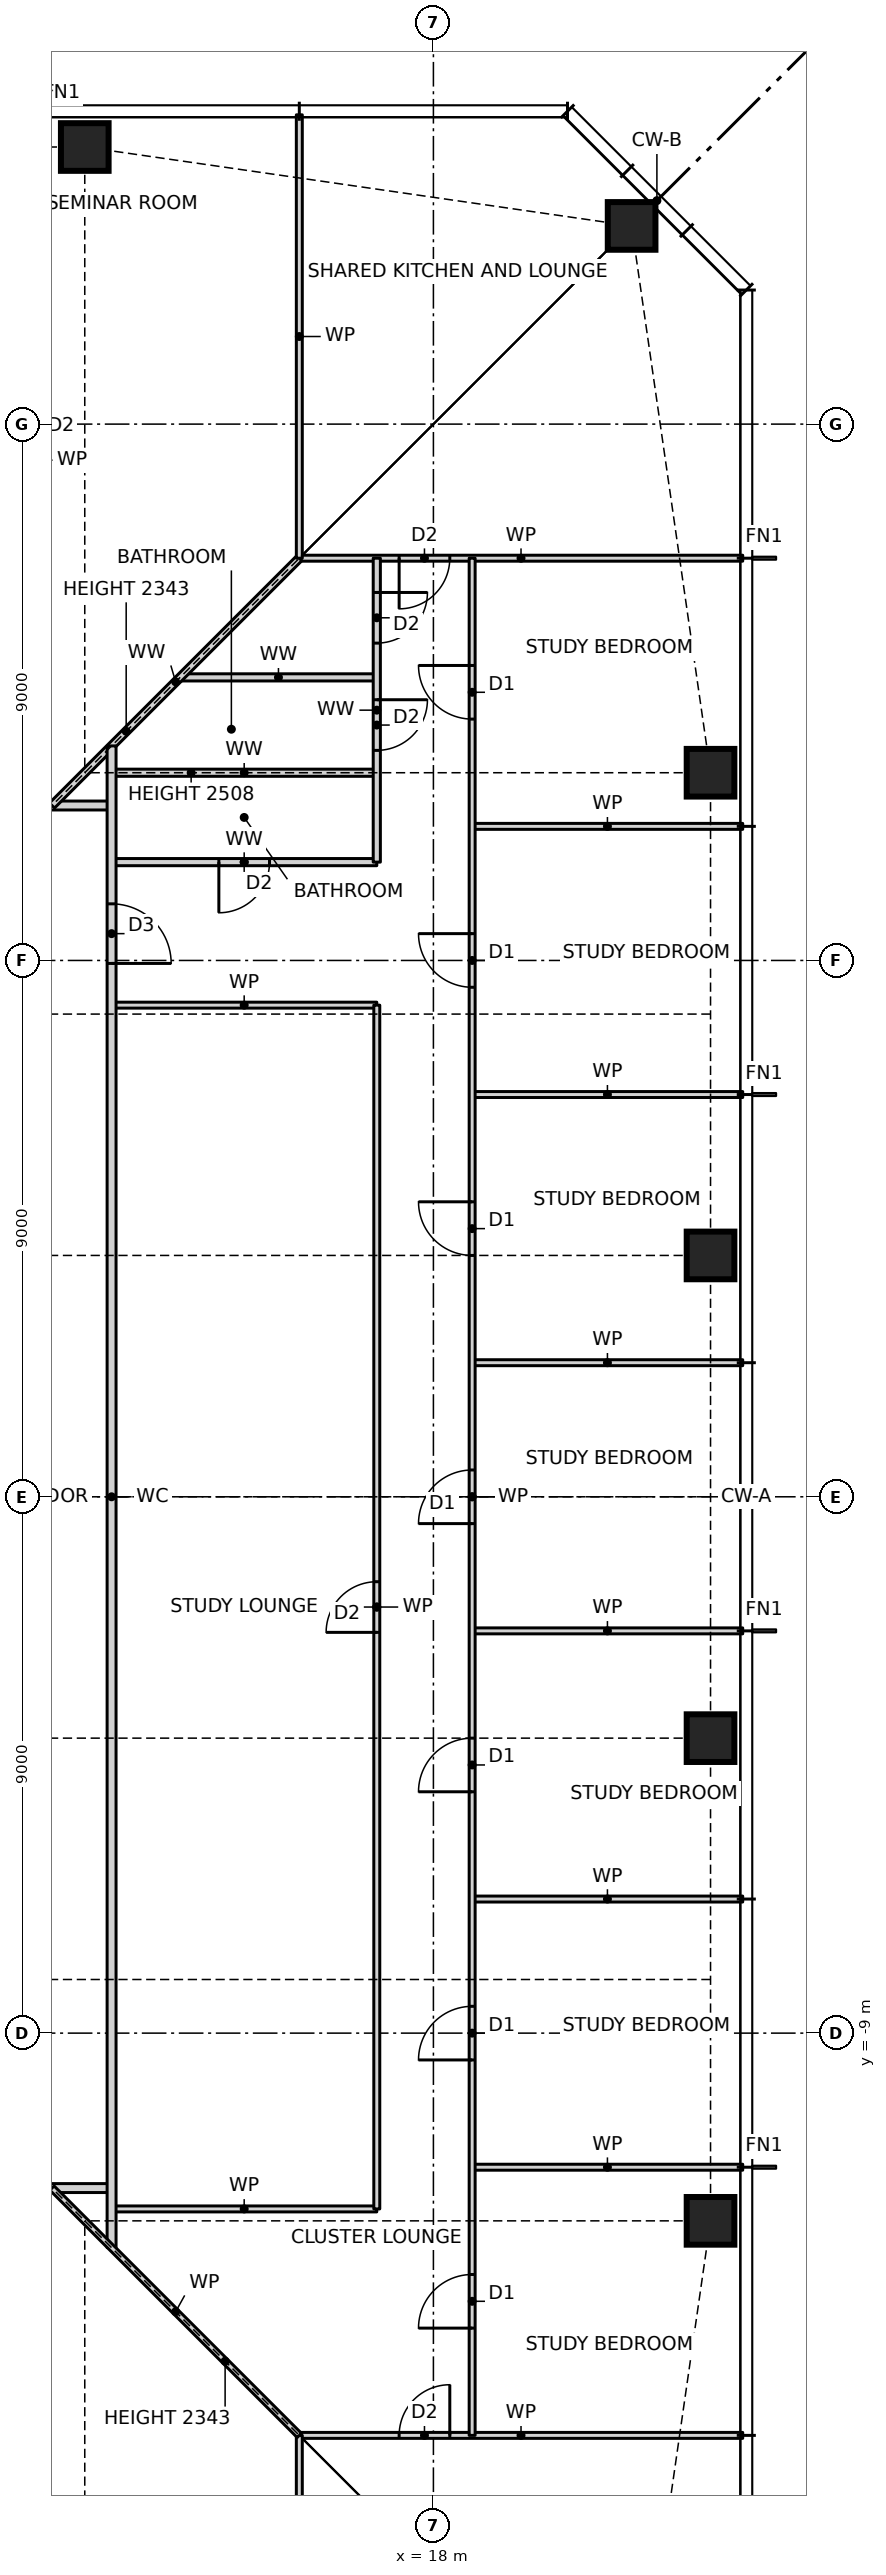
"""IFC4 building model, lengths in metres.
Left out: names, types, materials, properties, quantities, classifications, styles, units other than length and angle.
Written with IfcOpenShell. Run it as: python <this file> out.ifc"""

import sys

from ifc_helpers import new_model, si_unit, direction, frame, frame_2d, origin, origin_2d, place, context, subcontext, project, spatial, rectangle, hollow_rectangle, extrude, element, fill, save


model = new_model("IFC4")
c1 = context("Model", 3, precision=1e-05, world=origin(), true_north=direction((0.0, 1.0)))
c2 = subcontext(c1, "Body", "Model", "MODEL_VIEW")
j1 = project(units=[si_unit("LENGTHUNIT", "METRE"), si_unit("PLANEANGLEUNIT", "RADIAN")], contexts=[c1])
p1 = place(None, origin())
s1 = spatial("IfcSite", under=j1, at=p1, CompositionType="ELEMENT")
p2 = place(p1, origin())
s2 = spatial("IfcBuilding", under=s1, at=p2, CompositionType="ELEMENT")
p3 = place(p2, frame((0.0, 0.0, 25.5)))
s3 = spatial("IfcBuildingStorey", under=s2, at=p3, CompositionType="ELEMENT", Elevation=25.5)
for number, where, z_axis, x_axis in (
    (1, (22.65, -12.15, 0.0), (0.0, 0.0, 1.0), (1.0, 0.0, 0.0)),
    (2, (22.65, -4.05, 0.0), (0.0, 0.0, 1.0), (1.0, 0.0, 0.0)),
    (3, (22.65, 4.05, 0.0), (0.0, 0.0, 1.0), (1.0, 0.0, 0.0)),
    (4, (22.65, 12.15, 0.0), (0.0, 0.0, 1.0), (1.0, 0.0, 0.0)),
    (5, (21.326, 21.326, 0.0), (0.0, 0.0, 1.0), (1.0, 0.0, 0.0)),
    (6, (12.15, 22.65, 0.0), (0.0, 0.0, 1.0), (1.0, 0.0, 0.0)),
):
    element("IfcColumn", number, at=place(p3, frame(where, z_axis=z_axis, x_axis=x_axis)), inside=s3, PredefinedType="COLUMN", context=c2, shape_type="SweptSolid", body=[
        extrude(hollow_rectangle(XDim=0.8, YDim=0.8, WallThickness=0.09, at=origin_2d()), origin(), (0.0, 0.0, 1.0), 3.5),
    ])
p4 = place(p3, frame((15.75, -15.75, 0.0), z_axis=(0.0, 0.0, 1.0), x_axis=(1.0, 0.0, 0.0)))
e7 = element("IfcWall", 7, at=p4, inside=s3, PredefinedType="PARTITIONING", context=c2, shape_type="SweptSolid", body=[
    extrude(rectangle(XDim=7.44, YDim=0.1, at=frame_2d((3.72, 0.0))), origin(), (0.0, 0.0, 1.0), 3.27),
])
p5 = place(p4, frame((1.675, 0.0, 0.0)))
e8 = element("IfcOpeningElement", 8, at=p5, cuts=e7, PredefinedType="OPENING", context=c2, shape_type="SweptSolid", body=[
    extrude(rectangle(XDim=0.85, YDim=2.1, at=frame_2d((0.425, 1.05))), frame((0.0, 0.06, 0.0), z_axis=(0.0, -1.0, 0.0), x_axis=(1.0, 0.0, 0.0)), (0.0, 0.0, 1.0), 0.12),
])
p6 = place(p3, frame((12.6, -11.95, 0.0), z_axis=(0.0, 0.0, 1.0), x_axis=(1.0, 0.0, 0.0)))
e9 = element("IfcWall", 9, at=p6, inside=s3, PredefinedType="PARTITIONING", context=c2, shape_type="SweptSolid", body=[
    extrude(rectangle(XDim=4.45, YDim=0.1, at=frame_2d((2.225, 0.0))), origin(), (0.0, 0.0, 1.0), 3.27),
])
p7 = place(p3, frame((-11.6, -11.6, 0.0), z_axis=(0.0, 0.0, 1.0), x_axis=(1.0, 0.0, 0.0)))
e10 = element("IfcWall", 10, at=p7, inside=s3, PredefinedType="PARTITIONING", context=c2, shape_type="SweptSolid", body=[
    extrude(rectangle(XDim=24.2, YDim=0.15, at=frame_2d((12.1, 0.0))), origin(), (0.0, 0.0, 1.0), 3.27),
])
p8 = place(p7, frame((16.05, 0.0, 0.0)))
e11 = element("IfcOpeningElement", 11, at=p8, cuts=e10, PredefinedType="OPENING", context=c2, shape_type="SweptSolid", body=[
    extrude(rectangle(XDim=1.0, YDim=2.1, at=frame_2d((0.5, 1.05))), frame((0.0, 0.085, 0.0), z_axis=(0.0, -1.0, 0.0), x_axis=(1.0, 0.0, 0.0)), (0.0, 0.0, 1.0), 0.17),
])
for number, where, z_axis, x_axis in (
    (12, (18.65, -11.25, 0.0), (0.0, 0.0, 1.0), (1.0, 0.0, 0.0)),
    (13, (18.65, -6.75, 0.0), (0.0, 0.0, 1.0), (1.0, 0.0, 0.0)),
    (14, (18.65, -2.25, 0.0), (0.0, 0.0, 1.0), (1.0, 0.0, 0.0)),
    (15, (18.65, 2.25, 0.0), (0.0, 0.0, 1.0), (1.0, 0.0, 0.0)),
    (16, (18.65, 6.75, 0.0), (0.0, 0.0, 1.0), (1.0, 0.0, 0.0)),
):
    element("IfcWall", number, at=place(p3, frame(where, z_axis=z_axis, x_axis=x_axis)), inside=s3, PredefinedType="PARTITIONING", context=c2, shape_type="SweptSolid", body=[
        extrude(rectangle(XDim=4.54, YDim=0.1, at=frame_2d((2.27, 0.0))), origin(), (0.0, 0.0, 1.0), 3.27),
    ])
p9 = place(p3, frame((12.6, 8.25, 0.0), z_axis=(0.0, 0.0, 1.0), x_axis=(1.0, 0.0, 0.0)))
e17 = element("IfcWall", 17, at=p9, inside=s3, PredefinedType="PARTITIONING", context=c2, shape_type="SweptSolid", body=[
    extrude(rectangle(XDim=4.45, YDim=0.1, at=frame_2d((2.225, 0.0))), origin(), (0.0, 0.0, 1.0), 3.27),
])
p10 = place(p3, frame((12.6, 10.65, 0.0), z_axis=(0.0, 0.0, 1.0), x_axis=(1.0, 0.0, 0.0)))
e18 = element("IfcWall", 18, at=p10, inside=s3, PredefinedType="PARTITIONING", context=c2, shape_type="SweptSolid", body=[
    extrude(rectangle(XDim=4.45, YDim=0.12, at=frame_2d((2.225, 0.0))), origin(), (0.0, 0.0, 1.0), 3.27),
])
p11 = place(p10, frame((1.8, 0.0, 0.0)))
e19 = element("IfcOpeningElement", 19, at=p11, cuts=e18, PredefinedType="OPENING", context=c2, shape_type="SweptSolid", body=[
    extrude(rectangle(XDim=0.85, YDim=2.1, at=frame_2d((0.425, 1.05))), frame((0.0, 0.07, 0.0), z_axis=(0.0, -1.0, 0.0), x_axis=(1.0, 0.0, 0.0)), (0.0, 0.0, 1.0), 0.14),
])
p12 = place(p3, frame((18.65, 11.25, 0.0), z_axis=(0.0, 0.0, 1.0), x_axis=(1.0, 0.0, 0.0)))
e20 = element("IfcWall", 20, at=p12, inside=s3, PredefinedType="PARTITIONING", context=c2, shape_type="SweptSolid", body=[
    extrude(rectangle(XDim=4.54, YDim=0.1, at=frame_2d((2.27, 0.0))), origin(), (0.0, 0.0, 1.0), 3.27),
])
p13 = place(p3, frame((-11.6, 11.6, 0.0), z_axis=(0.0, 0.0, 1.0), x_axis=(1.0, 0.0, 0.0)))
e21 = element("IfcWall", 21, at=p13, inside=s3, PredefinedType="PARTITIONING", context=c2, shape_type="SweptSolid", body=[
    extrude(rectangle(XDim=24.2, YDim=0.15, at=frame_2d((12.1, 0.0))), origin(), (0.0, 0.0, 1.0), 3.27),
])
p14 = place(p13, frame((12.855, 0.0, 0.0)))
e22 = element("IfcOpeningElement", 22, at=p14, cuts=e21, PredefinedType="OPENING", context=c2, shape_type="SweptSolid", body=[
    extrude(rectangle(XDim=1.0, YDim=2.1, at=frame_2d((0.5, 1.05))), frame((0.0, 0.085, 0.0), z_axis=(0.0, -1.0, 0.0), x_axis=(1.0, 0.0, 0.0)), (0.0, 0.0, 1.0), 0.17),
])
p15 = place(p3, frame((12.6, 12.15, 0.0), z_axis=(0.0, 0.0, 1.0), x_axis=(1.0, 0.0, 0.0)))
e23 = element("IfcWall", 23, at=p15, inside=s3, PredefinedType="PARTITIONING", context=c2, shape_type="SweptSolid", body=[
    extrude(rectangle(XDim=4.45, YDim=0.12, at=frame_2d((2.225, 0.0))), origin(), (0.0, 0.0, 1.0), 2.508),
])
p16 = place(p3, frame((13.75, 13.75, 0.0), z_axis=(0.0, 0.0, 1.0), x_axis=(1.0, 0.0, 0.0)))
e24 = element("IfcWall", 24, at=p16, inside=s3, PredefinedType="PARTITIONING", context=c2, shape_type="SweptSolid", body=[
    extrude(rectangle(XDim=3.3, YDim=0.12, at=frame_2d((1.65, 0.0))), origin(), (0.0, 0.0, 1.0), 3.27),
])
p17 = place(p3, frame((15.75, 15.75, 0.0), z_axis=(0.0, 0.0, 1.0), x_axis=(1.0, 0.0, 0.0)))
e25 = element("IfcWall", 25, at=p17, inside=s3, PredefinedType="PARTITIONING", context=c2, shape_type="SweptSolid", body=[
    extrude(rectangle(XDim=7.44, YDim=0.1, at=frame_2d((3.72, 0.0))), origin(), (0.0, 0.0, 1.0), 3.27),
])
p18 = place(p17, frame((1.675, 0.0, 0.0)))
e26 = element("IfcOpeningElement", 26, at=p18, cuts=e25, PredefinedType="OPENING", context=c2, shape_type="SweptSolid", body=[
    extrude(rectangle(XDim=0.85, YDim=2.1, at=frame_2d((0.425, 1.05))), frame((0.0, 0.06, 0.0), z_axis=(0.0, -1.0, 0.0), x_axis=(1.0, 0.0, 0.0)), (0.0, 0.0, 1.0), 0.12),
])
p19 = place(p3, frame((11.6, 11.6, 0.0), z_axis=(0.0, 0.0, 1.0), x_axis=(0.707106781187, 0.707106781187, 0.0)))
e27 = element("IfcWall", 27, at=p19, inside=s3, PredefinedType="PARTITIONING", context=c2, shape_type="SweptSolid", body=[
    extrude(rectangle(XDim=5.869, YDim=0.12, at=frame_2d((2.935, 0.0))), origin(), (0.0, 0.0, 1.0), 2.343),
])
p20 = place(p3, frame((18.65, -15.75, 0.0), z_axis=(0.0, 0.0, 1.0), x_axis=(0.0, 1.0, 0.0)))
e28 = element("IfcWall", 28, at=p20, inside=s3, PredefinedType="PARTITIONING", context=c2, shape_type="SweptSolid", body=[
    extrude(rectangle(XDim=31.5, YDim=0.1, at=frame_2d((15.75, 0.0))), origin(), (0.0, 0.0, 1.0), 3.27),
])
p21 = place(p20, frame((1.8, 0.0, 0.0)))
e29 = element("IfcOpeningElement", 29, at=p21, cuts=e28, PredefinedType="OPENING", context=c2, shape_type="SweptSolid", body=[
    extrude(rectangle(XDim=0.9, YDim=2.1, at=frame_2d((0.45, 1.05))), frame((0.0, 0.06, 0.0), z_axis=(0.0, -1.0, 0.0), x_axis=(1.0, 0.0, 0.0)), (0.0, 0.0, 1.0), 0.12),
])
p22 = place(p20, frame((6.3, 0.0, 0.0)))
e30 = element("IfcOpeningElement", 30, at=p22, cuts=e28, PredefinedType="OPENING", context=c2, shape_type="SweptSolid", body=[
    extrude(rectangle(XDim=0.9, YDim=2.1, at=frame_2d((0.45, 1.05))), frame((0.0, 0.06, 0.0), z_axis=(0.0, -1.0, 0.0), x_axis=(1.0, 0.0, 0.0)), (0.0, 0.0, 1.0), 0.12),
])
p23 = place(p20, frame((10.8, 0.0, 0.0)))
e31 = element("IfcOpeningElement", 31, at=p23, cuts=e28, PredefinedType="OPENING", context=c2, shape_type="SweptSolid", body=[
    extrude(rectangle(XDim=0.9, YDim=2.1, at=frame_2d((0.45, 1.05))), frame((0.0, 0.06, 0.0), z_axis=(0.0, -1.0, 0.0), x_axis=(1.0, 0.0, 0.0)), (0.0, 0.0, 1.0), 0.12),
])
p24 = place(p20, frame((15.3, 0.0, 0.0)))
e32 = element("IfcOpeningElement", 32, at=p24, cuts=e28, PredefinedType="OPENING", context=c2, shape_type="SweptSolid", body=[
    extrude(rectangle(XDim=0.9, YDim=2.1, at=frame_2d((0.45, 1.05))), frame((0.0, 0.06, 0.0), z_axis=(0.0, -1.0, 0.0), x_axis=(1.0, 0.0, 0.0)), (0.0, 0.0, 1.0), 0.12),
])
p25 = place(p20, frame((19.8, 0.0, 0.0)))
e33 = element("IfcOpeningElement", 33, at=p25, cuts=e28, PredefinedType="OPENING", context=c2, shape_type="SweptSolid", body=[
    extrude(rectangle(XDim=0.9, YDim=2.1, at=frame_2d((0.45, 1.05))), frame((0.0, 0.06, 0.0), z_axis=(0.0, -1.0, 0.0), x_axis=(1.0, 0.0, 0.0)), (0.0, 0.0, 1.0), 0.12),
])
p26 = place(p20, frame((24.3, 0.0, 0.0)))
e34 = element("IfcOpeningElement", 34, at=p26, cuts=e28, PredefinedType="OPENING", context=c2, shape_type="SweptSolid", body=[
    extrude(rectangle(XDim=0.9, YDim=2.1, at=frame_2d((0.45, 1.05))), frame((0.0, 0.06, 0.0), z_axis=(0.0, -1.0, 0.0), x_axis=(1.0, 0.0, 0.0)), (0.0, 0.0, 1.0), 0.12),
])
p27 = place(p20, frame((28.8, 0.0, 0.0)))
e35 = element("IfcOpeningElement", 35, at=p27, cuts=e28, PredefinedType="OPENING", context=c2, shape_type="SweptSolid", body=[
    extrude(rectangle(XDim=0.9, YDim=2.1, at=frame_2d((0.45, 1.05))), frame((0.0, 0.06, 0.0), z_axis=(0.0, -1.0, 0.0), x_axis=(1.0, 0.0, 0.0)), (0.0, 0.0, 1.0), 0.12),
])
p28 = place(p3, frame((17.05, -11.95, 0.0), z_axis=(0.0, 0.0, 1.0), x_axis=(0.0, 1.0, 0.0)))
e36 = element("IfcWall", 36, at=p28, inside=s3, PredefinedType="PARTITIONING", context=c2, shape_type="SweptSolid", body=[
    extrude(rectangle(XDim=20.2, YDim=0.1, at=frame_2d((10.1, 0.0))), origin(), (0.0, 0.0, 1.0), 3.27),
])
p29 = place(p28, frame((9.675, 0.0, 0.0)))
e37 = element("IfcOpeningElement", 37, at=p29, cuts=e36, PredefinedType="OPENING", context=c2, shape_type="SweptSolid", body=[
    extrude(rectangle(XDim=0.85, YDim=2.1, at=frame_2d((0.425, 1.05))), frame((0.0, 0.06, 0.0), z_axis=(0.0, -1.0, 0.0), x_axis=(1.0, 0.0, 0.0)), (0.0, 0.0, 1.0), 0.12),
])
p30 = place(p3, frame((17.05, 10.65, 0.0), z_axis=(0.0, 0.0, 1.0), x_axis=(0.0, 1.0, 0.0)))
e38 = element("IfcWall", 38, at=p30, inside=s3, PredefinedType="PARTITIONING", context=c2, shape_type="SweptSolid", body=[
    extrude(rectangle(XDim=5.1, YDim=0.12, at=frame_2d((2.55, 0.0))), origin(), (0.0, 0.0, 1.0), 3.27),
])
p31 = place(p30, frame((1.875, 0.0, 0.0)))
e39 = element("IfcOpeningElement", 39, at=p31, cuts=e38, PredefinedType="OPENING", context=c2, shape_type="SweptSolid", body=[
    extrude(rectangle(XDim=0.85, YDim=2.1, at=frame_2d((0.425, 1.05))), frame((0.0, 0.07, 0.0), z_axis=(0.0, -1.0, 0.0), x_axis=(1.0, 0.0, 0.0)), (0.0, 0.0, 1.0), 0.14),
])
p32 = place(p30, frame((3.675, 0.0, 0.0)))
e40 = element("IfcOpeningElement", 40, at=p32, cuts=e38, PredefinedType="OPENING", context=c2, shape_type="SweptSolid", body=[
    extrude(rectangle(XDim=0.85, YDim=2.1, at=frame_2d((0.425, 1.05))), frame((0.0, 0.07, 0.0), z_axis=(0.0, -1.0, 0.0), x_axis=(1.0, 0.0, 0.0)), (0.0, 0.0, 1.0), 0.14),
])
for number, where, z_axis, x_axis in (
    (41, (15.75, -23.19, 0.0), (0.0, 0.0, 1.0), (0.0, 1.0, 0.0)),
    (42, (15.75, 15.75, 0.0), (0.0, 0.0, 1.0), (0.0, 1.0, 0.0)),
):
    element("IfcWall", number, at=place(p3, frame(where, z_axis=z_axis, x_axis=x_axis)), inside=s3, PredefinedType="PARTITIONING", context=c2, shape_type="SweptSolid", body=[
        extrude(rectangle(XDim=7.44, YDim=0.1, at=frame_2d((3.72, 0.0))), origin(), (0.0, 0.0, 1.0), 3.27),
    ])
p33 = place(p3, frame((12.6, -12.6, 0.0), z_axis=(0.0, 0.0, 1.0), x_axis=(0.0, 1.0, 0.0)))
e43 = element("IfcWall", 43, at=p33, inside=s3, PredefinedType="PARTITIONING", context=c2, shape_type="SweptSolid", body=[
    extrude(rectangle(XDim=25.2, YDim=0.15, at=frame_2d((12.6, 0.0))), origin(), (0.0, 0.0, 1.0), 3.27),
])
p34 = place(p33, frame((21.55, 0.0, 0.0)))
e44 = element("IfcOpeningElement", 44, at=p34, cuts=e43, PredefinedType="OPENING", context=c2, shape_type="SweptSolid", body=[
    extrude(rectangle(XDim=1.0, YDim=2.1, at=frame_2d((0.5, 1.05))), frame((0.0, 0.085, 0.0), z_axis=(0.0, -1.0, 0.0), x_axis=(1.0, 0.0, 0.0)), (0.0, 0.0, 1.0), 0.17),
])
p35 = place(p3, frame((15.75, -15.75, 0.0), z_axis=(0.0, 0.0, 1.0), x_axis=(-0.707106781187, 0.707106781187, 0.0)))
e45 = element("IfcWall", 45, at=p35, inside=s3, PredefinedType="PARTITIONING", context=c2, shape_type="SweptSolid", body=[
    extrude(rectangle(XDim=5.869, YDim=0.1, at=frame_2d((2.935, 0.0))), origin(), (0.0, 0.0, 1.0), 2.343),
])
p36 = place(p21, origin())
e46 = element("IfcDoor", 46, at=p36, inside=s3, OperationType="SINGLE_SWING_LEFT", PredefinedType="DOOR", context=c2, shape_type="SweptSolid", body=[
    extrude(rectangle(XDim=0.9, YDim=2.1, at=frame_2d((0.45, 1.05))), frame((0.0, 0.025, 0.0), z_axis=(0.0, -1.0, 0.0), x_axis=(1.0, 0.0, 0.0)), (0.0, 0.0, 1.0), 0.05),
])
fill(e29, e46)
p37 = place(p22, origin())
e47 = element("IfcDoor", 47, at=p37, inside=s3, OperationType="SINGLE_SWING_LEFT", PredefinedType="DOOR", context=c2, shape_type="SweptSolid", body=[
    extrude(rectangle(XDim=0.9, YDim=2.1, at=frame_2d((0.45, 1.05))), frame((0.0, 0.025, 0.0), z_axis=(0.0, -1.0, 0.0), x_axis=(1.0, 0.0, 0.0)), (0.0, 0.0, 1.0), 0.05),
])
fill(e30, e47)
p38 = place(p23, origin())
e48 = element("IfcDoor", 48, at=p38, inside=s3, OperationType="SINGLE_SWING_LEFT", PredefinedType="DOOR", context=c2, shape_type="SweptSolid", body=[
    extrude(rectangle(XDim=0.9, YDim=2.1, at=frame_2d((0.45, 1.05))), frame((0.0, 0.025, 0.0), z_axis=(0.0, -1.0, 0.0), x_axis=(1.0, 0.0, 0.0)), (0.0, 0.0, 1.0), 0.05),
])
fill(e31, e48)
p39 = place(p24, origin())
e49 = element("IfcDoor", 49, at=p39, inside=s3, OperationType="SINGLE_SWING_LEFT", PredefinedType="DOOR", context=c2, shape_type="SweptSolid", body=[
    extrude(rectangle(XDim=0.9, YDim=2.1, at=frame_2d((0.45, 1.05))), frame((0.0, 0.025, 0.0), z_axis=(0.0, -1.0, 0.0), x_axis=(1.0, 0.0, 0.0)), (0.0, 0.0, 1.0), 0.05),
])
fill(e32, e49)
p40 = place(p25, origin())
e50 = element("IfcDoor", 50, at=p40, inside=s3, OperationType="SINGLE_SWING_RIGHT", PredefinedType="DOOR", context=c2, shape_type="SweptSolid", body=[
    extrude(rectangle(XDim=0.9, YDim=2.1, at=frame_2d((0.45, 1.05))), frame((0.0, 0.025, 0.0), z_axis=(0.0, -1.0, 0.0), x_axis=(1.0, 0.0, 0.0)), (0.0, 0.0, 1.0), 0.05),
])
fill(e33, e50)
p41 = place(p26, origin())
e51 = element("IfcDoor", 51, at=p41, inside=s3, OperationType="SINGLE_SWING_RIGHT", PredefinedType="DOOR", context=c2, shape_type="SweptSolid", body=[
    extrude(rectangle(XDim=0.9, YDim=2.1, at=frame_2d((0.45, 1.05))), frame((0.0, 0.025, 0.0), z_axis=(0.0, -1.0, 0.0), x_axis=(1.0, 0.0, 0.0)), (0.0, 0.0, 1.0), 0.05),
])
fill(e34, e51)
p42 = place(p27, origin())
e52 = element("IfcDoor", 52, at=p42, inside=s3, OperationType="SINGLE_SWING_RIGHT", PredefinedType="DOOR", context=c2, shape_type="SweptSolid", body=[
    extrude(rectangle(XDim=0.9, YDim=2.1, at=frame_2d((0.45, 1.05))), frame((0.0, 0.025, 0.0), z_axis=(0.0, -1.0, 0.0), x_axis=(1.0, 0.0, 0.0)), (0.0, 0.0, 1.0), 0.05),
])
fill(e35, e52)
p43 = place(p34, frame((1.0, 0.0, 0.0), z_axis=(0.0, 0.0, 1.0), x_axis=(-1.0, 0.0, 0.0)))
e53 = element("IfcDoor", 53, at=p43, inside=s3, OperationType="SINGLE_SWING_RIGHT", PredefinedType="DOOR", context=c2, shape_type="SweptSolid", body=[
    extrude(rectangle(XDim=1.0, YDim=2.1, at=frame_2d((0.5, 1.05))), frame((0.0, 0.025, 0.0), z_axis=(0.0, -1.0, 0.0), x_axis=(1.0, 0.0, 0.0)), (0.0, 0.0, 1.0), 0.05),
])
fill(e44, e53)
p44 = place(p29, origin())
e54 = element("IfcDoor", 54, at=p44, inside=s3, OperationType="SINGLE_SWING_LEFT", PredefinedType="DOOR", context=c2, shape_type="SweptSolid", body=[
    extrude(rectangle(XDim=0.85, YDim=2.1, at=frame_2d((0.425, 1.05))), frame((0.0, 0.025, 0.0), z_axis=(0.0, -1.0, 0.0), x_axis=(1.0, 0.0, 0.0)), (0.0, 0.0, 1.0), 0.05),
])
fill(e37, e54)
p45 = place(p11, frame((0.85, 0.0, 0.0), z_axis=(0.0, 0.0, 1.0), x_axis=(-1.0, 0.0, 0.0)))
e55 = element("IfcDoor", 55, at=p45, inside=s3, OperationType="SINGLE_SWING_RIGHT", PredefinedType="DOOR", context=c2, shape_type="SweptSolid", body=[
    extrude(rectangle(XDim=0.85, YDim=2.1, at=frame_2d((0.425, 1.05))), frame((0.0, 0.025, 0.0), z_axis=(0.0, -1.0, 0.0), x_axis=(1.0, 0.0, 0.0)), (0.0, 0.0, 1.0), 0.05),
])
fill(e19, e55)
p46 = place(p31, frame((0.85, 0.0, 0.0), z_axis=(0.0, 0.0, 1.0), x_axis=(-1.0, 0.0, 0.0)))
e56 = element("IfcDoor", 56, at=p46, inside=s3, OperationType="SINGLE_SWING_LEFT", PredefinedType="DOOR", context=c2, shape_type="SweptSolid", body=[
    extrude(rectangle(XDim=0.85, YDim=2.1, at=frame_2d((0.425, 1.05))), frame((0.0, 0.025, 0.0), z_axis=(0.0, -1.0, 0.0), x_axis=(1.0, 0.0, 0.0)), (0.0, 0.0, 1.0), 0.05),
])
fill(e39, e56)
p47 = place(p32, frame((0.85, 0.0, 0.0), z_axis=(0.0, 0.0, 1.0), x_axis=(-1.0, 0.0, 0.0)))
e57 = element("IfcDoor", 57, at=p47, inside=s3, OperationType="SINGLE_SWING_LEFT", PredefinedType="DOOR", context=c2, shape_type="SweptSolid", body=[
    extrude(rectangle(XDim=0.85, YDim=2.1, at=frame_2d((0.425, 1.05))), frame((0.0, 0.025, 0.0), z_axis=(0.0, -1.0, 0.0), x_axis=(1.0, 0.0, 0.0)), (0.0, 0.0, 1.0), 0.05),
])
fill(e40, e57)
p48 = place(p5, origin())
e58 = element("IfcDoor", 58, at=p48, inside=s3, OperationType="SINGLE_SWING_RIGHT", PredefinedType="DOOR", context=c2, shape_type="SweptSolid", body=[
    extrude(rectangle(XDim=0.85, YDim=2.1, at=frame_2d((0.425, 1.05))), frame((0.0, 0.025, 0.0), z_axis=(0.0, -1.0, 0.0), x_axis=(1.0, 0.0, 0.0)), (0.0, 0.0, 1.0), 0.05),
])
fill(e8, e58)
p49 = place(p18, frame((0.85, 0.0, 0.0), z_axis=(0.0, 0.0, 1.0), x_axis=(-1.0, 0.0, 0.0)))
e59 = element("IfcDoor", 59, at=p49, inside=s3, OperationType="SINGLE_SWING_RIGHT", PredefinedType="DOOR", context=c2, shape_type="SweptSolid", body=[
    extrude(rectangle(XDim=0.85, YDim=2.1, at=frame_2d((0.425, 1.05))), frame((0.0, 0.025, 0.0), z_axis=(0.0, -1.0, 0.0), x_axis=(1.0, 0.0, 0.0)), (0.0, 0.0, 1.0), 0.05),
])
fill(e26, e59)
save(model, sys.argv[1])
